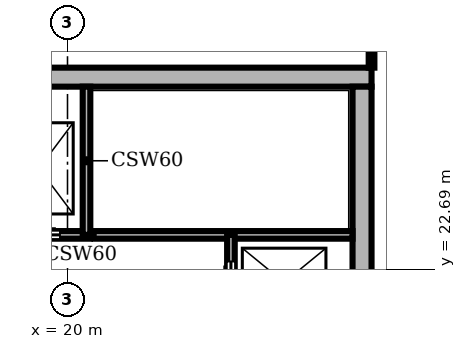
"""IFC4 building model, lengths in metres.
Left out: names, types, materials, properties, quantities, classifications, styles, units other than length and angle.
Written with IfcOpenShell. Run it as: python <this file> out.ifc"""

import sys

from ifc_helpers import new_model, si_unit, direction, frame, frame_2d, origin, place, context, subcontext, project, spatial, rectangle, extrude, element, fill, save


model = new_model("IFC4")
c1 = context("Model", 3, precision=1e-05, world=origin(), true_north=direction((0.0, 1.0)))
c2 = subcontext(c1, "Body", "Model", "MODEL_VIEW")
j1 = project(units=[si_unit("LENGTHUNIT", "METRE"), si_unit("PLANEANGLEUNIT", "RADIAN")], contexts=[c1])
p1 = place(None, origin())
s1 = spatial("IfcSite", under=j1, at=p1, CompositionType="ELEMENT")
p2 = place(p1, origin())
s2 = spatial("IfcBuilding", under=s1, at=p2, CompositionType="ELEMENT")
p3 = place(p2, frame((0.0, 0.0, 348.9)))
s3 = spatial("IfcBuildingStorey", under=s2, at=p3, CompositionType="ELEMENT", Elevation=348.9)
p4 = place(p3, frame((27.75, 8.5, 0.0), z_axis=(0.0, 0.0, 1.0), x_axis=(0.0, 1.0, 0.0)))
e1 = element("IfcWall", 1, at=p4, inside=s3, PredefinedType="SHEAR", context=c2, shape_type="SweptSolid", body=[
    extrude(rectangle(XDim=19.0, YDim=0.5, at=frame_2d((9.5, 0.0))), origin(), (0.0, 0.0, 1.0), 3.9),
])
p5 = place(p4, frame((4.95, 0.0, 0.0)))
e2 = element("IfcOpeningElement", 2, at=p5, cuts=e1, PredefinedType="OPENING", context=c2, shape_type="SweptSolid", body=[
    extrude(rectangle(XDim=1.6, YDim=2.1, at=frame_2d((0.8, 1.05))), frame((0.0, 0.26, 0.0), z_axis=(0.0, -1.0, 0.0), x_axis=(1.0, 0.0, 0.0)), (0.0, 0.0, 1.0), 0.52),
])
p6 = place(p3, frame((28.0, 27.75, 0.0), z_axis=(0.0, 0.0, 1.0), x_axis=(-1.0, 0.0, 0.0)))
e3 = element("IfcWall", 3, at=p6, inside=s3, PredefinedType="SHEAR", context=c2, shape_type="SweptSolid", body=[
    extrude(rectangle(XDim=20.0, YDim=0.5, at=frame_2d((10.0, 0.0))), origin(), (0.0, 0.0, 1.0), 3.9),
])
p7 = place(p3, frame((13.8, 23.6, 0.0), z_axis=(0.0, 0.0, 1.0), x_axis=(1.0, 0.0, 0.0)))
e4 = element("IfcWall", 4, at=p7, inside=s3, PredefinedType="SHEAR", context=c2, shape_type="SweptSolid", body=[
    extrude(rectangle(XDim=13.7, YDim=0.2, at=frame_2d((6.85, 0.0))), origin(), (0.0, 0.0, 1.0), 3.45),
])
p8 = place(p7, frame((2.4, 0.0, 0.0)))
e5 = element("IfcOpeningElement", 5, at=p8, cuts=e4, PredefinedType="OPENING", context=c2, shape_type="SweptSolid", body=[
    extrude(rectangle(XDim=1.1, YDim=2.1, at=frame_2d((0.55, 1.05))), frame((0.0, 0.11, 0.0), z_axis=(0.0, -1.0, 0.0), x_axis=(1.0, 0.0, 0.0)), (0.0, 0.0, 1.0), 0.22),
])
p9 = place(p7, frame((4.9, 0.0, 0.0)))
e6 = element("IfcOpeningElement", 6, at=p9, cuts=e4, PredefinedType="OPENING", context=c2, shape_type="SweptSolid", body=[
    extrude(rectangle(XDim=1.1, YDim=2.1, at=frame_2d((0.55, 1.05))), frame((0.0, 0.11, 0.0), z_axis=(0.0, -1.0, 0.0), x_axis=(1.0, 0.0, 0.0)), (0.0, 0.0, 1.0), 0.22),
])
p10 = place(p7, frame((0.15, 0.0, 0.0)))
e7 = element("IfcOpeningElement", 7, at=p10, cuts=e4, PredefinedType="OPENING", context=c2, shape_type="SweptSolid", body=[
    extrude(rectangle(XDim=1.0, YDim=2.1, at=frame_2d((0.5, 1.05))), frame((0.0, 0.11, 0.0), z_axis=(0.0, -1.0, 0.0), x_axis=(1.0, 0.0, 0.0)), (0.0, 0.0, 1.0), 0.22),
])
p11 = place(p3, frame((20.5, 23.6, 0.0), z_axis=(0.0, 0.0, 1.0), x_axis=(0.0, 1.0, 0.0)))
e8 = element("IfcWall", 8, at=p11, inside=s3, PredefinedType="SHEAR", context=c2, shape_type="SweptSolid", body=[
    extrude(rectangle(XDim=3.9, YDim=0.2, at=frame_2d((1.95, 0.0))), origin(), (0.0, 0.0, 1.0), 3.45),
])
p12 = place(p3, frame((24.3, 16.1, 0.0), z_axis=(0.0, 0.0, 1.0), x_axis=(0.0, 1.0, 0.0)))
e9 = element("IfcWall", 9, at=p12, inside=s3, PredefinedType="SHEAR", context=c2, shape_type="SweptSolid", body=[
    extrude(rectangle(XDim=7.5, YDim=0.2, at=frame_2d((3.75, 0.0))), origin(), (0.0, 0.0, 1.0), 3.45),
])
p13 = place(p12, frame((5.7, 0.0, 0.0)))
e10 = element("IfcOpeningElement", 10, at=p13, cuts=e9, PredefinedType="OPENING", context=c2, shape_type="SweptSolid", body=[
    extrude(rectangle(XDim=1.1, YDim=2.1, at=frame_2d((0.55, 1.05))), frame((0.0, 0.11, 0.0), z_axis=(0.0, -1.0, 0.0), x_axis=(1.0, 0.0, 0.0)), (0.0, 0.0, 1.0), 0.22),
])
p14 = place(p3, frame((28.0, 28.0, 0.0), z_axis=(0.0, 0.0, 1.0), x_axis=(0.0, 1.0, 0.0)))
e11 = element("IfcWall", 11, at=p14, inside=s3, PredefinedType="PARTITIONING", context=c2, shape_type="SweptSolid", body=[
    extrude(rectangle(XDim=2.598, YDim=0.15, at=frame_2d((1.299, 0.0))), origin(), (0.0, 0.0, 1.0), 3.45),
])
p15 = place(p13, origin())
e12 = element("IfcDoor", 12, at=p15, inside=s3, OperationType="DOUBLE_DOOR_SLIDING", PredefinedType="DOOR", context=c2, shape_type="SweptSolid", body=[
    extrude(rectangle(XDim=1.1, YDim=2.1, at=frame_2d((0.55, 1.05))), frame((0.0, 0.025, 0.0), z_axis=(0.0, -1.0, 0.0), x_axis=(1.0, 0.0, 0.0)), (0.0, 0.0, 1.0), 0.05),
])
fill(e10, e12)
p16 = place(p9, origin())
e13 = element("IfcDoor", 13, at=p16, inside=s3, OperationType="DOUBLE_DOOR_SLIDING", PredefinedType="DOOR", context=c2, shape_type="SweptSolid", body=[
    extrude(rectangle(XDim=1.1, YDim=2.1, at=frame_2d((0.55, 1.05))), frame((0.0, 0.025, 0.0), z_axis=(0.0, -1.0, 0.0), x_axis=(1.0, 0.0, 0.0)), (0.0, 0.0, 1.0), 0.05),
])
fill(e6, e13)
save(model, sys.argv[1])
